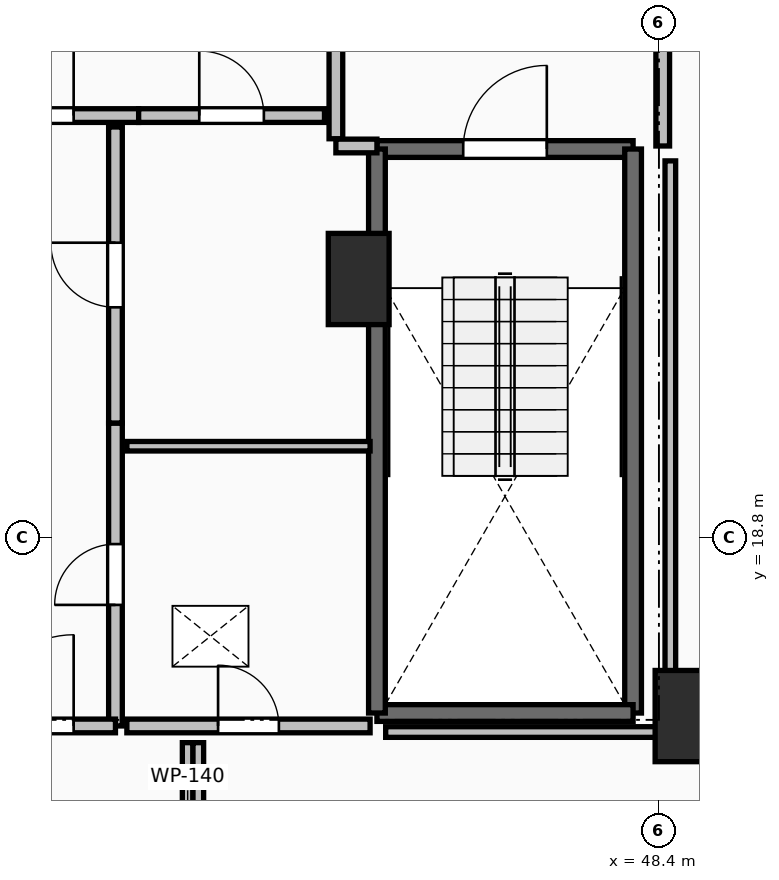
"""IFC4 building model, lengths in metres.
Left out: names, types, materials, properties, quantities, classifications, styles, units other than length and angle.
Written with IfcOpenShell. Run it as: python <this file> out.ifc"""

import sys

from ifc_helpers import new_model, si_unit, direction, frame, frame_2d, origin, origin_2d, place, context, subcontext, project, spatial, rectangle, extrude, element, fill, save


model = new_model("IFC4")
c1 = context("Model", 3, precision=1e-05, world=origin(), true_north=direction((0.0, 1.0)))
c2 = subcontext(c1, "Body", "Model", "MODEL_VIEW")
j1 = project(units=[si_unit("LENGTHUNIT", "METRE"), si_unit("PLANEANGLEUNIT", "RADIAN")], contexts=[c1])
p1 = place(None, origin())
s1 = spatial("IfcSite", under=j1, at=p1, CompositionType="ELEMENT")
p2 = place(p1, origin())
s2 = spatial("IfcBuilding", under=s1, at=p2, CompositionType="ELEMENT")
p3 = place(p2, frame((0.0, 0.0, 153.6)))
s3 = spatial("IfcBuildingStorey", under=s2, at=p3, CompositionType="ELEMENT", Elevation=153.6)
for number, where, z_axis, x_axis in (
    (1, (48.75, 16.45, 0.0), (0.0, 0.0, 1.0), (1.0, 0.0, 0.0)),
    (2, (44.45, 22.2, 0.0), (0.0, 0.0, 1.0), (1.0, 0.0, 0.0)),
):
    element("IfcColumn", number, at=place(p3, frame(where, z_axis=z_axis, x_axis=x_axis)), inside=s3, PredefinedType="PILASTER", context=c2, shape_type="SweptSolid", body=[
        extrude(rectangle(XDim=0.8, YDim=1.2, at=origin_2d()), origin(), (0.0, 0.0, 1.0), 3.5),
    ])
p4 = place(p3, frame((44.69, 23.91, 0.0), z_axis=(0.0, 0.0, 1.0), x_axis=(1.0, 0.0, 0.0)))
e3 = element("IfcWall", 3, at=p4, inside=s3, PredefinedType="SOLIDWALL", context=c2, shape_type="SweptSolid", body=[
    extrude(rectangle(XDim=3.37, YDim=0.22, at=frame_2d((1.685, 0.0))), origin(), (0.0, 0.0, 1.0), 3.24),
])
p5 = place(p4, frame((1.135, 0.0, 0.0)))
e4 = element("IfcOpeningElement", 4, at=p5, cuts=e3, PredefinedType="OPENING", context=c2, shape_type="SweptSolid", body=[
    extrude(rectangle(XDim=1.1, YDim=2.15, at=frame_2d((0.55, 1.075))), frame((0.0, 0.125, 0.0), z_axis=(0.0, -1.0, 0.0), x_axis=(1.0, 0.0, 0.0)), (0.0, 0.0, 1.0), 0.25),
])
p6 = place(p3, frame((48.06, 23.91, 0.0), z_axis=(0.0, 0.0, 1.0), x_axis=(0.0, -1.0, 0.0)))
e5 = element("IfcWall", 5, at=p6, inside=s3, PredefinedType="SOLIDWALL", context=c2, shape_type="SweptSolid", body=[
    extrude(rectangle(XDim=7.42, YDim=0.22, at=frame_2d((3.71, 0.0))), origin(), (0.0, 0.0, 1.0), 3.24),
])
p7 = place(p3, frame((48.06, 16.49, 0.0), z_axis=(0.0, 0.0, 1.0), x_axis=(-1.0, 0.0, 0.0)))
e6 = element("IfcWall", 6, at=p7, inside=s3, PredefinedType="SOLIDWALL", context=c2, shape_type="SweptSolid", body=[
    extrude(rectangle(XDim=3.37, YDim=0.22, at=frame_2d((1.685, 0.0))), origin(), (0.0, 0.0, 1.0), 3.24),
])
p8 = place(p3, frame((44.69, 16.49, 0.0), z_axis=(0.0, 0.0, 1.0), x_axis=(0.0, 1.0, 0.0)))
e7 = element("IfcWall", 7, at=p8, inside=s3, PredefinedType="SOLIDWALL", context=c2, shape_type="SweptSolid", body=[
    extrude(rectangle(XDim=7.42, YDim=0.22, at=frame_2d((3.71, 0.0))), origin(), (0.0, 0.0, 1.0), 3.24),
])
p9 = place(p3, frame((44.15, 27.955, 0.0), z_axis=(0.0, 0.0, 1.0), x_axis=(0.0, -1.0, 0.0)))
e8 = element("IfcWall", 8, at=p9, inside=s3, PredefinedType="PARTITIONING", context=c2, shape_type="SweptSolid", body=[
    extrude(rectangle(XDim=3.91, YDim=0.18, at=frame_2d((1.955, 0.0))), origin(), (0.0, 0.0, 1.0), 3.24),
])
p10 = place(p9, frame((1.355, 0.0, 0.0)))
e9 = element("IfcOpeningElement", 9, at=p10, cuts=e8, PredefinedType="OPENING", context=c2, shape_type="SweptSolid", body=[
    extrude(rectangle(XDim=1.2, YDim=2.15, at=frame_2d((0.6, 1.075))), frame((0.0, 0.105, 0.0), z_axis=(0.0, -1.0, 0.0), x_axis=(1.0, 0.0, 0.0)), (0.0, 0.0, 1.0), 0.21),
])
p11 = place(p3, frame((44.15, 23.95, 0.0), z_axis=(0.0, 0.0, 1.0), x_axis=(1.0, 0.0, 0.0)))
e10 = element("IfcWall", 10, at=p11, inside=s3, PredefinedType="PARTITIONING", context=c2, shape_type="SweptSolid", body=[
    extrude(rectangle(XDim=0.54, YDim=0.18, at=frame_2d((0.27, 0.0))), origin(), (0.0, 0.0, 1.0), 3.24),
])
p12 = place(p3, frame((48.45, 23.95, 0.0), z_axis=(0.0, 0.0, 1.0), x_axis=(0.0, 1.0, 0.0)))
e11 = element("IfcWall", 11, at=p12, inside=s3, PredefinedType="PARTITIONING", context=c2, shape_type="SweptSolid", body=[
    extrude(rectangle(XDim=4.05, YDim=0.18, at=frame_2d((2.025, 0.0))), origin(), (0.0, 0.0, 1.0), 3.24),
])
p13 = place(p12, frame((1.425, 0.0, 0.0)))
e12 = element("IfcOpeningElement", 12, at=p13, cuts=e11, PredefinedType="OPENING", context=c2, shape_type="SweptSolid", body=[
    extrude(rectangle(XDim=1.2, YDim=2.15, at=frame_2d((0.6, 1.075))), frame((0.0, 0.105, 0.0), z_axis=(0.0, -1.0, 0.0), x_axis=(1.0, 0.0, 0.0)), (0.0, 0.0, 1.0), 0.21),
])
p14 = place(p3, frame((38.645, 24.35, 0.0), z_axis=(0.0, 0.0, 1.0), x_axis=(1.0, 0.0, 0.0)))
e13 = element("IfcWall", 13, at=p14, inside=s3, PredefinedType="PARTITIONING", context=c2, shape_type="SweptSolid", body=[
    extrude(rectangle(XDim=2.91, YDim=0.18, at=frame_2d((1.455, 0.0))), origin(), (0.0, 0.0, 1.0), 3.24),
])
p15 = place(p14, frame((0.855, 0.0, 0.0)))
e14 = element("IfcOpeningElement", 14, at=p15, cuts=e13, PredefinedType="OPENING", context=c2, shape_type="SweptSolid", body=[
    extrude(rectangle(XDim=1.2, YDim=2.15, at=frame_2d((0.6, 1.075))), frame((0.0, 0.105, 0.0), z_axis=(0.0, -1.0, 0.0), x_axis=(1.0, 0.0, 0.0)), (0.0, 0.0, 1.0), 0.21),
])
p16 = place(p3, frame((41.555, 24.35, 0.0), z_axis=(0.0, 0.0, 1.0), x_axis=(1.0, 0.0, 0.0)))
e15 = element("IfcWall", 15, at=p16, inside=s3, PredefinedType="PARTITIONING", context=c2, shape_type="SweptSolid", body=[
    extrude(rectangle(XDim=2.445, YDim=0.18, at=frame_2d((1.223, 0.0))), origin(), (0.0, 0.0, 1.0), 3.24),
])
p17 = place(p16, frame((0.798, 0.0, 0.0)))
e16 = element("IfcOpeningElement", 16, at=p17, cuts=e15, PredefinedType="OPENING", context=c2, shape_type="SweptSolid", body=[
    extrude(rectangle(XDim=0.85, YDim=2.1, at=frame_2d((0.425, 1.05))), frame((0.0, 0.105, 0.0), z_axis=(0.0, -1.0, 0.0), x_axis=(1.0, 0.0, 0.0)), (0.0, 0.0, 1.0), 0.21),
])
p18 = place(p3, frame((41.25, 16.32, 0.0), z_axis=(0.0, 0.0, 1.0), x_axis=(0.0, 1.0, 0.0)))
e17 = element("IfcWall", 17, at=p18, inside=s3, PredefinedType="PARTITIONING", context=c2, shape_type="SweptSolid", body=[
    extrude(rectangle(XDim=3.985, YDim=0.18, at=frame_2d((1.992, 0.0))), origin(), (0.0, 0.0, 1.0), 3.24),
])
p19 = place(p18, frame((1.593, 0.0, 0.0)))
e18 = element("IfcOpeningElement", 18, at=p19, cuts=e17, PredefinedType="OPENING", context=c2, shape_type="SweptSolid", body=[
    extrude(rectangle(XDim=0.8, YDim=2.05, at=frame_2d((0.4, 1.025))), frame((0.0, 0.105, 0.0), z_axis=(0.0, -1.0, 0.0), x_axis=(1.0, 0.0, 0.0)), (0.0, 0.0, 1.0), 0.21),
])
p20 = place(p3, frame((41.25, 20.305, 0.0), z_axis=(0.0, 0.0, 1.0), x_axis=(0.0, 1.0, 0.0)))
e19 = element("IfcWall", 19, at=p20, inside=s3, PredefinedType="PARTITIONING", context=c2, shape_type="SweptSolid", body=[
    extrude(rectangle(XDim=3.895, YDim=0.18, at=frame_2d((1.948, 0.0))), origin(), (0.0, 0.0, 1.0), 3.24),
])
p21 = place(p20, frame((1.522, 0.0, 0.0)))
e20 = element("IfcOpeningElement", 20, at=p21, cuts=e19, PredefinedType="OPENING", context=c2, shape_type="SweptSolid", body=[
    extrude(rectangle(XDim=0.85, YDim=2.1, at=frame_2d((0.425, 1.05))), frame((0.0, 0.105, 0.0), z_axis=(0.0, -1.0, 0.0), x_axis=(1.0, 0.0, 0.0)), (0.0, 0.0, 1.0), 0.21),
])
p22 = place(p3, frame((38.95, 16.32, 0.0), z_axis=(0.0, 0.0, 1.0), x_axis=(1.0, 0.0, 0.0)))
e21 = element("IfcWall", 21, at=p22, inside=s3, PredefinedType="PARTITIONING", context=c2, shape_type="SweptSolid", body=[
    extrude(rectangle(XDim=2.3, YDim=0.18, at=frame_2d((1.15, 0.0))), origin(), (0.0, 0.0, 1.0), 3.24),
])
p23 = place(p22, frame((0.55, 0.0, 0.0)))
e22 = element("IfcOpeningElement", 22, at=p23, cuts=e21, PredefinedType="OPENING", context=c2, shape_type="SweptSolid", body=[
    extrude(rectangle(XDim=1.2, YDim=2.15, at=frame_2d((0.6, 1.075))), frame((0.0, 0.105, 0.0), z_axis=(0.0, -1.0, 0.0), x_axis=(1.0, 0.0, 0.0)), (0.0, 0.0, 1.0), 0.21),
])
p24 = place(p3, frame((44.6, 20.0, 0.0), z_axis=(0.0, 0.0, 1.0), x_axis=(-1.0, 0.0, 0.0)))
e23 = element("IfcWall", 23, at=p24, inside=s3, PredefinedType="PARTITIONING", context=c2, shape_type="SweptSolid", body=[
    extrude(rectangle(XDim=3.2, YDim=0.125, at=frame_2d((1.6, 0.0))), origin(), (0.0, 0.0, 1.0), 3.24),
])
p25 = place(p3, frame((41.4, 16.32, 0.0), z_axis=(0.0, 0.0, 1.0), x_axis=(1.0, 0.0, 0.0)))
e24 = element("IfcWall", 24, at=p25, inside=s3, PredefinedType="PARTITIONING", context=c2, shape_type="SweptSolid", body=[
    extrude(rectangle(XDim=3.2, YDim=0.18, at=frame_2d((1.6, 0.0))), origin(), (0.0, 0.0, 1.0), 3.24),
])
p26 = place(p25, frame((1.2, 0.0, 0.0)))
e25 = element("IfcOpeningElement", 25, at=p26, cuts=e24, PredefinedType="OPENING", context=c2, shape_type="SweptSolid", body=[
    extrude(rectangle(XDim=0.8, YDim=2.05, at=frame_2d((0.4, 1.025))), frame((0.0, 0.105, 0.0), z_axis=(0.0, -1.0, 0.0), x_axis=(1.0, 0.0, 0.0)), (0.0, 0.0, 1.0), 0.21),
])
p27 = place(p3, frame((44.805, 16.24, 0.0), z_axis=(0.0, 0.0, 1.0), x_axis=(1.0, 0.0, 0.0)))
e26 = element("IfcWall", 26, at=p27, inside=s3, PredefinedType="PARTITIONING", context=c2, shape_type="SweptSolid", body=[
    extrude(rectangle(XDim=3.745, YDim=0.14, at=frame_2d((1.873, 0.0))), origin(), (0.0, 0.0, 1.0), 2.432),
])
p28 = place(p3, frame((48.55, 16.24, 0.0), z_axis=(0.0, 0.0, 1.0), x_axis=(0.0, 1.0, 0.0)))
e27 = element("IfcWall", 27, at=p28, inside=s3, PredefinedType="PARTITIONING", context=c2, shape_type="SweptSolid", body=[
    extrude(rectangle(XDim=7.514, YDim=0.14, at=frame_2d((3.757, 0.0))), origin(), (0.0, 0.0, 1.0), 2.432),
])
for number, where, z_axis, x_axis in (
    (28, (42.2, 16.1, 0.0), (0.0, 0.0, 1.0), (0.0, -1.0, 0.0)),
    (29, (42.34, 14.27, 0.0), (0.0, 0.0, 1.0), (0.0, 1.0, 0.0)),
):
    element("IfcWall", number, at=place(p3, frame(where, z_axis=z_axis, x_axis=x_axis)), inside=s3, PredefinedType="PARTITIONING", context=c2, shape_type="SweptSolid", body=[
        extrude(rectangle(XDim=1.83, YDim=0.14, at=frame_2d((0.915, 0.0))), origin(), (0.0, 0.0, 1.0), 2.886),
    ])
p29 = place(p5, origin())
e30 = element("IfcDoor", 30, at=p29, inside=s3, OperationType="SINGLE_SWING_RIGHT", PredefinedType="DOOR", context=c2, shape_type="SweptSolid", body=[
    extrude(rectangle(XDim=1.1, YDim=2.15, at=frame_2d((0.55, 1.075))), frame((0.0, 0.025, 0.0), z_axis=(0.0, -1.0, 0.0), x_axis=(1.0, 0.0, 0.0)), (0.0, 0.0, 1.0), 0.05),
])
fill(e4, e30)
p30 = place(p15, origin())
e31 = element("IfcDoor", 31, at=p30, inside=s3, OperationType="SINGLE_SWING_RIGHT", PredefinedType="DOOR", context=c2, shape_type="SweptSolid", body=[
    extrude(rectangle(XDim=1.2, YDim=2.15, at=frame_2d((0.6, 1.075))), frame((0.0, 0.025, 0.0), z_axis=(0.0, -1.0, 0.0), x_axis=(1.0, 0.0, 0.0)), (0.0, 0.0, 1.0), 0.05),
])
fill(e14, e31)
p31 = place(p17, origin())
e32 = element("IfcDoor", 32, at=p31, inside=s3, OperationType="SINGLE_SWING_LEFT", PredefinedType="DOOR", context=c2, shape_type="SweptSolid", body=[
    extrude(rectangle(XDim=0.85, YDim=2.1, at=frame_2d((0.425, 1.05))), frame((0.0, 0.025, 0.0), z_axis=(0.0, -1.0, 0.0), x_axis=(1.0, 0.0, 0.0)), (0.0, 0.0, 1.0), 0.05),
])
fill(e16, e32)
p32 = place(p19, origin())
e33 = element("IfcDoor", 33, at=p32, inside=s3, OperationType="SINGLE_SWING_LEFT", PredefinedType="DOOR", context=c2, shape_type="SweptSolid", body=[
    extrude(rectangle(XDim=0.8, YDim=2.05, at=frame_2d((0.4, 1.025))), frame((0.0, 0.025, 0.0), z_axis=(0.0, -1.0, 0.0), x_axis=(1.0, 0.0, 0.0)), (0.0, 0.0, 1.0), 0.05),
])
fill(e18, e33)
p33 = place(p21, origin())
e34 = element("IfcDoor", 34, at=p33, inside=s3, OperationType="SINGLE_SWING_RIGHT", PredefinedType="DOOR", context=c2, shape_type="SweptSolid", body=[
    extrude(rectangle(XDim=0.85, YDim=2.1, at=frame_2d((0.425, 1.05))), frame((0.0, 0.025, 0.0), z_axis=(0.0, -1.0, 0.0), x_axis=(1.0, 0.0, 0.0)), (0.0, 0.0, 1.0), 0.05),
])
fill(e20, e34)
p34 = place(p23, origin())
e35 = element("IfcDoor", 35, at=p34, inside=s3, OperationType="SINGLE_SWING_RIGHT", PredefinedType="DOOR", context=c2, shape_type="SweptSolid", body=[
    extrude(rectangle(XDim=1.2, YDim=2.15, at=frame_2d((0.6, 1.075))), frame((0.0, 0.025, 0.0), z_axis=(0.0, -1.0, 0.0), x_axis=(1.0, 0.0, 0.0)), (0.0, 0.0, 1.0), 0.05),
])
fill(e22, e35)
p35 = place(p26, origin())
e36 = element("IfcDoor", 36, at=p35, inside=s3, OperationType="SINGLE_SWING_LEFT", PredefinedType="DOOR", context=c2, shape_type="SweptSolid", body=[
    extrude(rectangle(XDim=0.8, YDim=2.05, at=frame_2d((0.4, 1.025))), frame((0.0, 0.025, 0.0), z_axis=(0.0, -1.0, 0.0), x_axis=(1.0, 0.0, 0.0)), (0.0, 0.0, 1.0), 0.05),
])
fill(e25, e36)
save(model, sys.argv[1])
